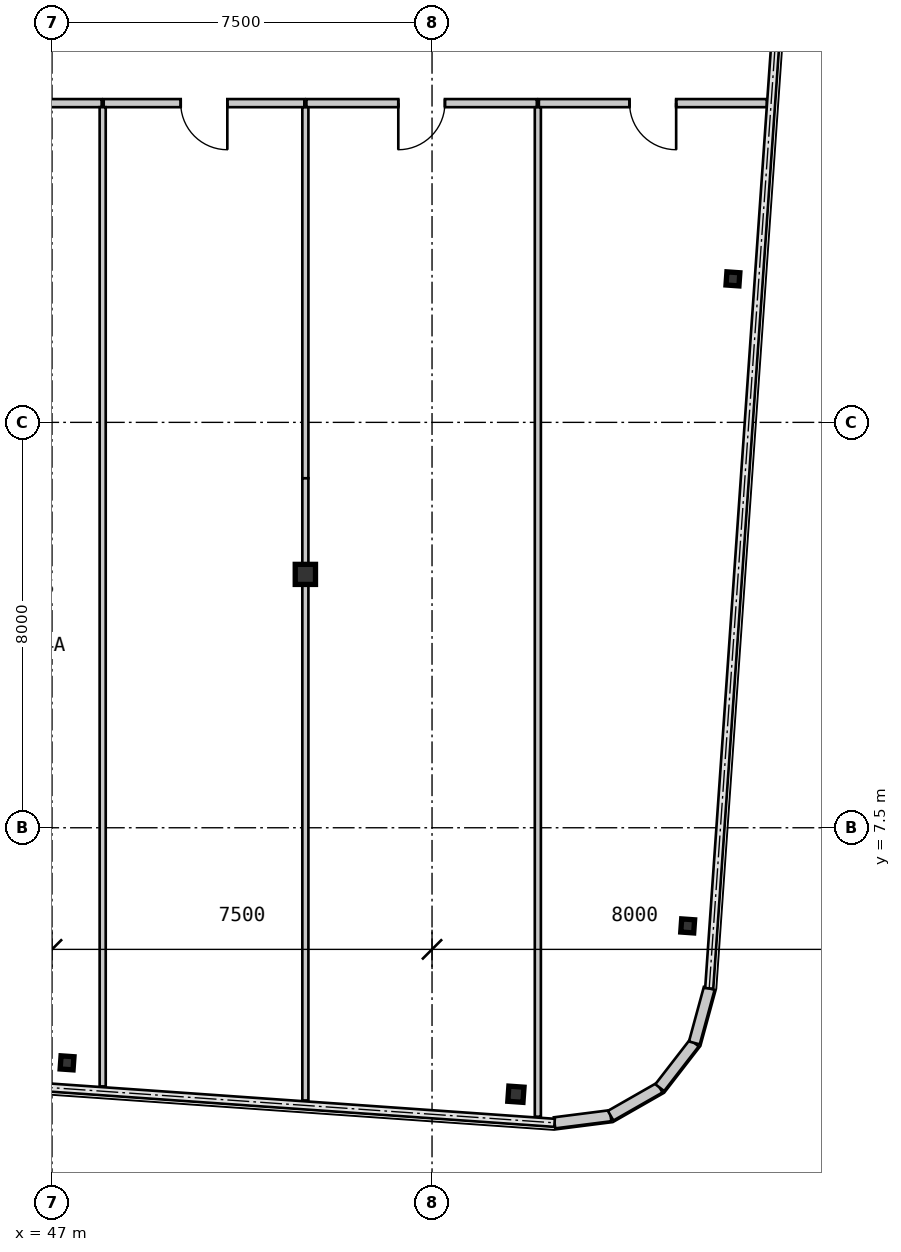
"""IFC4 building model, lengths in metres.
Left out: names, types, materials, properties, quantities, classifications, styles, units other than length and angle.
Written with IfcOpenShell. Run it as: python <this file> out.ifc"""

import sys

from ifc_helpers import new_model, si_unit, direction, frame, frame_2d, origin, origin_2d, place, context, subcontext, project, spatial, rectangle, hollow_rectangle, i_section, extrude, source, transform, mapped, element, fill, save


model = new_model("IFC4")
c1 = context("Model", 3, precision=1e-05, world=origin(), true_north=direction((0.0, 1.0)))
c2 = subcontext(c1, "Body", "Model", "MODEL_VIEW")
j1 = project(units=[si_unit("LENGTHUNIT", "METRE"), si_unit("PLANEANGLEUNIT", "RADIAN")], contexts=[c1])
p1 = place(None, origin())
s1 = spatial("IfcSite", under=j1, at=p1, CompositionType="ELEMENT")
p2 = place(p1, origin())
s2 = spatial("IfcBuilding", under=s1, at=p2, CompositionType="ELEMENT")
p3 = place(p2, frame((0.0, 0.0, 158.2)))
s3 = spatial("IfcBuildingStorey", under=s2, at=p3, CompositionType="ELEMENT", Elevation=158.2)
m1 = source(origin(), c2, "Body", "SweptSolid", [
    extrude(i_section(OverallWidth=0.4, OverallDepth=0.396, WebThickness=0.022, FlangeThickness=0.034, at=origin_2d()), origin(), (0.0, 0.0, 1.0), 3.15),
])
p4 = place(p3, frame((52.0, 12.5, 0.0), z_axis=(0.0, 0.0, 1.0), x_axis=(1.0, 0.0, 0.0)))
e1 = element("IfcColumn", 1, at=p4, inside=s3, PredefinedType="COLUMN", context=c2, shape_type="MappedRepresentation", body=[
    mapped(m1, transform((0.0, 0.0, 0.0), scale=1.0)),
])
m2 = source(origin(), c2, "Body", "SweptSolid", [
    extrude(i_section(OverallWidth=0.256, OverallDepth=0.26, WebThickness=0.01, FlangeThickness=0.017, at=origin_2d()), origin(), (0.0, 0.0, 1.0), 3.15),
])
p5 = place(p3, frame((47.297, 2.861, 0.0), z_axis=(0.0, 0.0, 1.0), x_axis=(0.99756405026, -0.069756473744, 0.0)))
e2 = element("IfcColumn", 2, at=p5, inside=s3, PredefinedType="COLUMN", context=c2, shape_type="MappedRepresentation", body=[
    mapped(m2, transform((0.0, 0.0, 0.0), scale=1.0)),
])
m3 = source(origin(), c2, "Body", "SweptSolid", [
    extrude(hollow_rectangle(XDim=0.3, YDim=0.3, WallThickness=0.012, at=origin_2d()), origin(), (0.0, 0.0, 1.0), 3.15),
])
p6 = place(p3, frame((56.156, 2.241, 0.0), z_axis=(0.0, 0.0, 1.0), x_axis=(0.99756405026, -0.069756473744, 0.0)))
e3 = element("IfcColumn", 3, at=p6, inside=s3, PredefinedType="COLUMN", context=c2, shape_type="MappedRepresentation", body=[
    mapped(m3, transform((0.0, 0.0, 0.0), scale=1.0)),
])
for number, where, z_axis, x_axis in (
    (4, (59.545, 5.563, 0.0), (0.0, 0.0, 1.0), (0.998, -0.07, 0.0)),
    (5, (60.438, 18.332, 0.0), (0.0, 0.0, 1.0), (0.998, -0.07, 0.0)),
):
    element("IfcColumn", number, at=place(p3, frame(where, z_axis=z_axis, x_axis=x_axis)), inside=s3, PredefinedType="COLUMN", context=c2, shape_type="MappedRepresentation", body=[
        mapped(m2, transform((0.0, 0.0, 0.0), scale=1.0)),
    ])
m4 = source(origin(), c2, "Body", "SweptSolid", [
    extrude(rectangle(XDim=1.116, YDim=0.22, at=frame_2d((0.558, 0.0))), origin(), (0.0, 0.0, 1.0), 2.93),
])
p7 = place(p3, frame((56.918, 1.677, 0.0), z_axis=(0.0, 0.0, 1.0), x_axis=(0.99202678349, 0.126027222605, 0.0)))
e6 = element("IfcWall", 6, at=p7, inside=s3, PredefinedType="SOLIDWALL", context=c2, shape_type="MappedRepresentation", body=[
    mapped(m4, transform((0.0, 0.0, 0.0), scale=1.0)),
])
m5 = source(origin(), c2, "Body", "SweptSolid", [
    extrude(rectangle(XDim=1.116, YDim=0.22, at=frame_2d((0.558, 0.0))), origin(), (0.0, 0.0, 1.0), 2.93),
])
for number, where, z_axis, x_axis in (
    (7, (58.025, 1.817, 0.0), (0.0, 0.0, 1.0), (0.868, 0.496, 0.0)),
    (8, (58.994, 2.371, 0.0), (0.0, 0.0, 1.0), (0.612, 0.791, 0.0)),
    (9, (59.677, 3.254, 0.0), (0.0, 0.0, 1.0), (0.263, 0.965, 0.0)),
):
    element("IfcWall", number, at=place(p3, frame(where, z_axis=z_axis, x_axis=x_axis)), inside=s3, PredefinedType="SOLIDWALL", context=c2, shape_type="MappedRepresentation", body=[
        mapped(m5, transform((0.0, 0.0, 0.0), scale=1.0)),
    ])
m6 = source(origin(), c2, "Body", "SweptSolid", [
    extrude(rectangle(XDim=3.959, YDim=0.16, at=frame_2d((1.98, 0.0))), origin(), (0.0, 0.0, 1.0), 2.93),
])
p8 = place(p3, frame((47.98, 21.8, 0.0), z_axis=(0.0, 0.0, 1.0), x_axis=(-1.0, 0.0, 0.0)))
e10 = element("IfcWall", 10, at=p8, inside=s3, PredefinedType="PARTITIONING", context=c2, shape_type="MappedRepresentation", body=[
    mapped(m6, transform((0.0, 0.0, 0.0), scale=1.0)),
])
m7 = source(origin(), c2, "Body", "SweptSolid", [
    extrude(rectangle(XDim=0.92, YDim=2.1, at=frame_2d((0.46, 1.05))), frame((0.0, 0.09, 0.0), z_axis=(0.0, -1.0, 0.0), x_axis=(1.0, 0.0, 0.0)), (0.0, 0.0, 1.0), 0.18),
])
p9 = place(p8, frame((1.52, 0.0, 0.0)))
e11 = element("IfcOpeningElement", 11, at=p9, cuts=e10, PredefinedType="OPENING", context=c2, shape_type="MappedRepresentation", body=[
    mapped(m7, transform((0.0, 0.0, 0.0), scale=1.0)),
])
p10 = place(p3, frame((51.98, 21.8, 0.0), z_axis=(0.0, 0.0, 1.0), x_axis=(-1.0, 0.0, 0.0)))
e12 = element("IfcWall", 12, at=p10, inside=s3, PredefinedType="PARTITIONING", context=c2, shape_type="MappedRepresentation", body=[
    mapped(m6, transform((0.0, 0.0, 0.0), scale=1.0)),
])
p11 = place(p10, frame((1.52, 0.0, 0.0)))
e13 = element("IfcOpeningElement", 13, at=p11, cuts=e12, PredefinedType="OPENING", context=c2, shape_type="MappedRepresentation", body=[
    mapped(m7, transform((0.0, 0.0, 0.0), scale=1.0)),
])
m8 = source(origin(), c2, "Body", "SweptSolid", [
    extrude(rectangle(XDim=4.547, YDim=0.16, at=frame_2d((2.274, 0.0))), origin(), (0.0, 0.0, 1.0), 2.93),
])
p12 = place(p3, frame((56.568, 21.8, 0.0), z_axis=(0.0, 0.0, 1.0), x_axis=(-1.0, 0.0, 0.0)))
e14 = element("IfcWall", 14, at=p12, inside=s3, PredefinedType="PARTITIONING", context=c2, shape_type="MappedRepresentation", body=[
    mapped(m8, transform((0.0, 0.0, 0.0), scale=1.0)),
])
p13 = place(p12, frame((1.814, 0.0, 0.0)))
e15 = element("IfcOpeningElement", 15, at=p13, cuts=e14, PredefinedType="OPENING", context=c2, shape_type="MappedRepresentation", body=[
    mapped(m7, transform((0.0, 0.0, 0.0), scale=1.0)),
])
m9 = source(origin(), c2, "Body", "SweptSolid", [
    extrude(rectangle(XDim=4.499, YDim=0.16, at=frame_2d((2.25, 0.0))), origin(), (0.0, 0.0, 1.0), 2.93),
])
p14 = place(p3, frame((61.107, 21.8, 0.0), z_axis=(0.0, 0.0, 1.0), x_axis=(-1.0, 0.0, 0.0)))
e16 = element("IfcWall", 16, at=p14, inside=s3, PredefinedType="PARTITIONING", context=c2, shape_type="MappedRepresentation", body=[
    mapped(m9, transform((0.0, 0.0, 0.0), scale=1.0)),
])
p15 = place(p14, frame((1.79, 0.0, 0.0)))
e17 = element("IfcOpeningElement", 17, at=p15, cuts=e16, PredefinedType="OPENING", context=c2, shape_type="MappedRepresentation", body=[
    mapped(m7, transform((0.0, 0.0, 0.0), scale=1.0)),
])
m10 = source(origin(), c2, "Body", "SweptSolid", [
    extrude(rectangle(XDim=19.324, YDim=0.12, at=frame_2d((9.662, 0.0))), origin(), (0.0, 0.0, 1.0), 2.93),
])
p16 = place(p3, frame((48.0, 21.72, 0.0), z_axis=(0.0, 0.0, 1.0), x_axis=(0.0, -1.0, 0.0)))
e18 = element("IfcWall", 18, at=p16, inside=s3, PredefinedType="PARTITIONING", context=c2, shape_type="MappedRepresentation", body=[
    mapped(m10, transform((0.0, 0.0, 0.0), scale=1.0)),
])
m11 = source(origin(), c2, "Body", "SweptSolid", [
    extrude(rectangle(XDim=7.322, YDim=0.12, at=frame_2d((3.661, 0.0))), origin(), (0.0, 0.0, 1.0), 2.93),
])
p17 = place(p3, frame((52.0, 21.718, 0.0), z_axis=(0.0, 0.0, 1.0), x_axis=(0.0, -1.0, 0.0)))
e19 = element("IfcWall", 19, at=p17, inside=s3, PredefinedType="PARTITIONING", context=c2, shape_type="MappedRepresentation", body=[
    mapped(m11, transform((0.0, 0.0, 0.0), scale=1.0)),
])
m12 = source(origin(), c2, "Body", "SweptSolid", [
    extrude(rectangle(XDim=1.901, YDim=0.12, at=frame_2d((0.951, 0.0))), origin(), (0.0, 0.0, 1.0), 2.397),
])
p18 = place(p3, frame((52.0, 14.396, 0.0), z_axis=(0.0, 0.0, 1.0), x_axis=(0.0, -1.0, 0.0)))
e20 = element("IfcWall", 20, at=p18, inside=s3, PredefinedType="PARTITIONING", context=c2, shape_type="MappedRepresentation", body=[
    mapped(m12, transform((0.0, 0.0, 0.0), scale=1.0)),
])
m13 = source(origin(), c2, "Body", "SweptSolid", [
    extrude(rectangle(XDim=10.376, YDim=0.12, at=frame_2d((5.188, 0.0))), origin(), (0.0, 0.0, 1.0), 2.93),
])
p19 = place(p3, frame((52.0, 12.495, 0.0), z_axis=(0.0, 0.0, 1.0), x_axis=(0.0, -1.0, 0.0)))
e21 = element("IfcWall", 21, at=p19, inside=s3, PredefinedType="PARTITIONING", context=c2, shape_type="MappedRepresentation", body=[
    mapped(m13, transform((0.0, 0.0, 0.0), scale=1.0)),
])
m14 = source(origin(), c2, "Body", "SweptSolid", [
    extrude(rectangle(XDim=19.92, YDim=0.12, at=frame_2d((9.96, 0.0))), origin(), (0.0, 0.0, 1.0), 2.93),
])
p20 = place(p3, frame((56.588, 21.718, 0.0), z_axis=(0.0, 0.0, 1.0), x_axis=(0.0, -1.0, 0.0)))
e22 = element("IfcWall", 22, at=p20, inside=s3, PredefinedType="PARTITIONING", context=c2, shape_type="MappedRepresentation", body=[
    mapped(m14, transform((0.0, 0.0, 0.0), scale=1.0)),
])
m15 = source(origin(), c2, "Body", "SweptSolid", [
    extrude(rectangle(XDim=0.92, YDim=2.1, at=frame_2d((0.46, 1.05))), frame((0.0, 0.025, 0.0), z_axis=(0.0, -1.0, 0.0), x_axis=(1.0, 0.0, 0.0)), (0.0, 0.0, 1.0), 0.05),
])
p21 = place(p11, origin())
e23 = element("IfcDoor", 23, at=p21, inside=s3, OperationType="SINGLE_SWING_LEFT", PredefinedType="DOOR", context=c2, shape_type="MappedRepresentation", body=[
    mapped(m15, transform((0.0, 0.0, 0.0), scale=1.0)),
])
fill(e13, e23)
p22 = place(p13, origin())
e24 = element("IfcDoor", 24, at=p22, inside=s3, OperationType="SINGLE_SWING_RIGHT", PredefinedType="DOOR", context=c2, shape_type="MappedRepresentation", body=[
    mapped(m15, transform((0.0, 0.0, 0.0), scale=1.0)),
])
fill(e15, e24)
p23 = place(p15, origin())
e25 = element("IfcDoor", 25, at=p23, inside=s3, OperationType="SINGLE_SWING_LEFT", PredefinedType="DOOR", context=c2, shape_type="MappedRepresentation", body=[
    mapped(m15, transform((0.0, 0.0, 0.0), scale=1.0)),
])
fill(e17, e25)
save(model, sys.argv[1])
